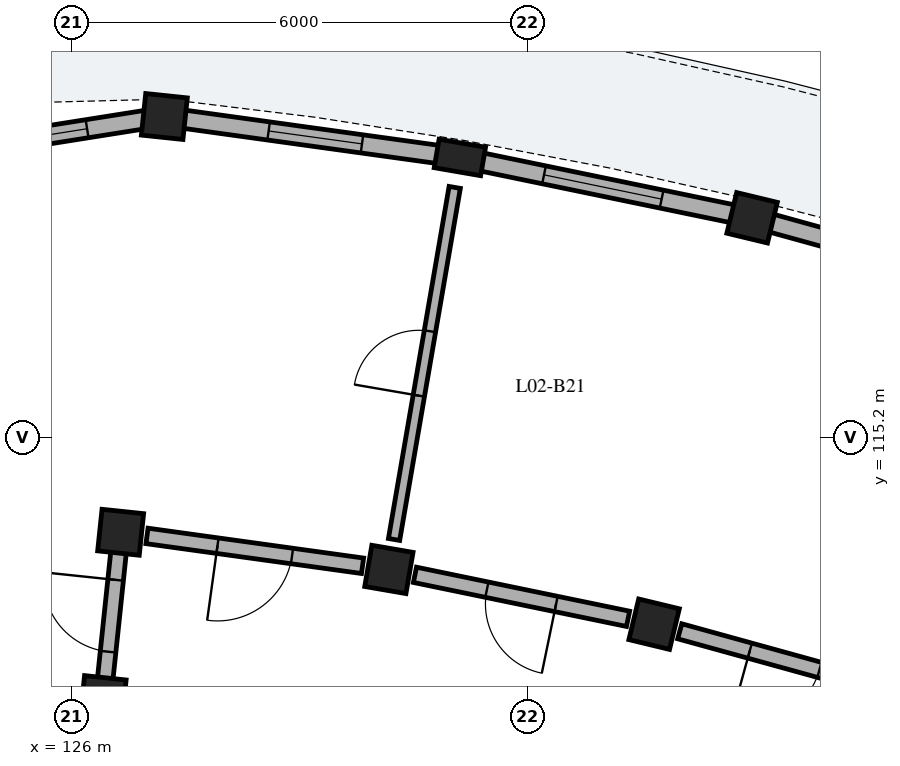
"""IFC4 building model, lengths in metres.
Left out: names, types, materials, properties, quantities, classifications, styles, units other than length and angle.
Written with IfcOpenShell. Run it as: python <this file> out.ifc"""

import sys

from ifc_helpers import new_model, si_unit, direction, frame, frame_2d, origin, origin_2d, place, context, subcontext, project, spatial, rectangle, extrude, element, fill, save


model = new_model("IFC4")
c1 = context("Model", 3, precision=1e-05, world=origin(), true_north=direction((0.0, 1.0)))
c2 = subcontext(c1, "Body", "Model", "MODEL_VIEW")
j1 = project(units=[si_unit("LENGTHUNIT", "METRE"), si_unit("PLANEANGLEUNIT", "RADIAN")], contexts=[c1])
p1 = place(None, origin())
s1 = spatial("IfcSite", under=j1, at=p1, CompositionType="ELEMENT")
p2 = place(p1, origin())
s2 = spatial("IfcBuilding", under=s1, at=p2, CompositionType="ELEMENT")
p3 = place(p2, frame((0.0, 0.0, 8.84)))
s3 = spatial("IfcBuildingStorey", under=s2, at=p3, CompositionType="ELEMENT", Elevation=8.84)
for number, where, z_axis, x_axis in (
    (1, (133.669, 112.744, 0.0), (0.0, 0.0, 1.0), (0.234, 0.972, 0.0)),
    (2, (134.958, 118.091, 0.0), (0.0, 0.0, 1.0), (0.234, 0.972, 0.0)),
    (3, (130.179, 113.465, 0.0), (0.0, 0.0, 1.0), (0.17, 0.985, 0.0)),
):
    element("IfcColumn", number, at=place(p3, frame(where, z_axis=z_axis, x_axis=x_axis)), inside=s3, PredefinedType="COLUMN", context=c2, shape_type="SweptSolid", body=[
        extrude(rectangle(XDim=0.55, YDim=0.55, at=origin_2d()), origin(), (0.0, 0.0, 1.0), 3.105),
    ])
p4 = place(p3, frame((131.113, 118.885, 0.0), z_axis=(0.0, 0.0, 1.0), x_axis=(0.169827230012, 0.985473851478, 0.0)))
e4 = element("IfcColumn", 4, at=p4, inside=s3, PredefinedType="PILASTER", context=c2, shape_type="SweptSolid", body=[
    extrude(rectangle(XDim=0.38, YDim=0.62, at=origin_2d()), origin(), (0.0, 0.0, 1.0), 3.105),
])
for number, where, z_axis, x_axis in (
    (5, (126.42, 111.766, 0.0), (0.0, 0.0, 1.0), (0.105, 0.995, 0.0)),
    (6, (126.65, 113.954, 0.0), (0.0, 0.0, 1.0), (0.105, 0.995, 0.0)),
    (7, (127.225, 119.424, 0.0), (0.0, 0.0, 1.0), (0.105, 0.995, 0.0)),
):
    element("IfcColumn", number, at=place(p3, frame(where, z_axis=z_axis, x_axis=x_axis)), inside=s3, PredefinedType="COLUMN", context=c2, shape_type="SweptSolid", body=[
        extrude(rectangle(XDim=0.55, YDim=0.55, at=origin_2d()), origin(), (0.0, 0.0, 1.0), 3.105),
    ])
p5 = place(p3, frame((138.587, 117.088, 0.0), z_axis=(0.0, 0.0, 1.0), x_axis=(-0.963894473631, 0.266284516456, 0.0)))
e8 = element("IfcWall", 8, at=p5, inside=s3, PredefinedType="SOLIDWALL", context=c2, shape_type="SweptSolid", body=[
    extrude(rectangle(XDim=3.521, YDim=0.24, at=frame_2d((1.76, 0.0))), origin(), (0.0, 0.0, 1.0), 2.355),
])
p6 = place(p5, frame((1.12, 0.0, 0.55)))
e9 = element("IfcOpeningElement", 9, at=p6, cuts=e8, PredefinedType="OPENING", context=c2, shape_type="SweptSolid", body=[
    extrude(rectangle(XDim=1.28, YDim=1.52, at=frame_2d((0.64, 0.76))), frame((0.0, 0.13, 0.0), z_axis=(0.0, -1.0, 0.0), x_axis=(1.0, 0.0, 0.0)), (0.0, 0.0, 1.0), 0.26),
])
p7 = place(p3, frame((134.718, 118.141, 0.0), z_axis=(0.0, 0.0, 1.0), x_axis=(-0.979340051053, 0.202220336275, 0.0)))
e10 = element("IfcWall", 10, at=p7, inside=s3, PredefinedType="SOLIDWALL", context=c2, shape_type="SweptSolid", body=[
    extrude(rectangle(XDim=3.521, YDim=0.24, at=frame_2d((1.76, 0.0))), origin(), (0.0, 0.0, 1.0), 2.355),
])
p8 = place(p7, frame((0.97, 0.0, 0.35)))
e11 = element("IfcOpeningElement", 11, at=p8, cuts=e10, PredefinedType="OPENING", context=c2, shape_type="SweptSolid", body=[
    extrude(rectangle(XDim=1.58, YDim=1.68, at=frame_2d((0.79, 0.84))), frame((0.0, 0.13, 0.0), z_axis=(0.0, -1.0, 0.0), x_axis=(1.0, 0.0, 0.0)), (0.0, 0.0, 1.0), 0.26),
])
p9 = place(p3, frame((130.955, 118.907, 0.0), z_axis=(0.0, 0.0, 1.0), x_axis=(-0.990539718913, 0.137226328578, 0.0)))
e12 = element("IfcWall", 12, at=p9, inside=s3, PredefinedType="SOLIDWALL", context=c2, shape_type="SweptSolid", body=[
    extrude(rectangle(XDim=3.521, YDim=0.24, at=frame_2d((1.76, 0.0))), origin(), (0.0, 0.0, 1.0), 2.355),
])
p10 = place(p9, frame((1.14, 0.0, 0.55)))
e13 = element("IfcOpeningElement", 13, at=p10, cuts=e12, PredefinedType="OPENING", context=c2, shape_type="SweptSolid", body=[
    extrude(rectangle(XDim=1.24, YDim=1.535, at=frame_2d((0.62, 0.768))), frame((0.0, 0.13, 0.0), z_axis=(0.0, -1.0, 0.0), x_axis=(1.0, 0.0, 0.0)), (0.0, 0.0, 1.0), 0.26),
])
p11 = place(p3, frame((123.365, 118.812, 0.0), z_axis=(0.0, 0.0, 1.0), x_axis=(0.987690429048, 0.156421278498, 0.0)))
e14 = element("IfcWall", 14, at=p11, inside=s3, PredefinedType="SOLIDWALL", context=c2, shape_type="SweptSolid", body=[
    extrude(rectangle(XDim=3.908, YDim=0.24, at=frame_2d((1.954, 0.0))), origin(), (0.0, 0.0, 1.0), 2.355),
])
p12 = place(p11, frame((1.029, 0.0, 0.4)))
e15 = element("IfcOpeningElement", 15, at=p12, cuts=e14, PredefinedType="OPENING", context=c2, shape_type="SweptSolid", body=[
    extrude(rectangle(XDim=1.85, YDim=1.72, at=frame_2d((0.925, 0.86))), frame((0.0, 0.13, 0.0), z_axis=(0.0, -1.0, 0.0), x_axis=(1.0, 0.0, 0.0)), (0.0, 0.0, 1.0), 0.26),
])
p13 = place(p3, frame((136.766, 111.889, 0.0), z_axis=(0.0, 0.0, 1.0), x_axis=(-0.963890789093, 0.266297853356, 0.0)))
e16 = element("IfcWall", 16, at=p13, inside=s3, PredefinedType="PARTITIONING", context=c2, shape_type="SweptSolid", body=[
    extrude(rectangle(XDim=2.863, YDim=0.205, at=frame_2d((1.432, 0.0))), origin(), (0.0, 0.0, 1.0), 2.37),
])
p14 = place(p13, frame((0.957, 0.0, 0.0)))
e17 = element("IfcOpeningElement", 17, at=p14, cuts=e16, PredefinedType="OPENING", context=c2, shape_type="SweptSolid", body=[
    extrude(rectangle(XDim=0.95, YDim=2.13, at=frame_2d((0.475, 1.065))), frame((0.0, 0.113, 0.0), z_axis=(0.0, -1.0, 0.0), x_axis=(1.0, 0.0, 0.0)), (0.0, 0.0, 1.0), 0.225),
])
p15 = place(p3, frame((133.326, 112.815, 0.0), z_axis=(0.0, 0.0, 1.0), x_axis=(-0.979348418612, 0.202179808492, 0.0)))
e18 = element("IfcWall", 18, at=p15, inside=s3, PredefinedType="PARTITIONING", context=c2, shape_type="SweptSolid", body=[
    extrude(rectangle(XDim=2.863, YDim=0.205, at=frame_2d((1.432, 0.0))), origin(), (0.0, 0.0, 1.0), 2.37),
])
p16 = place(p15, frame((0.967, 0.0, 0.0)))
e19 = element("IfcOpeningElement", 19, at=p16, cuts=e18, PredefinedType="OPENING", context=c2, shape_type="SweptSolid", body=[
    extrude(rectangle(XDim=0.93, YDim=2.12, at=frame_2d((0.465, 1.06))), frame((0.0, 0.113, 0.0), z_axis=(0.0, -1.0, 0.0), x_axis=(1.0, 0.0, 0.0)), (0.0, 0.0, 1.0), 0.225),
])
p17 = place(p3, frame((130.247, 113.859, 0.0), z_axis=(0.0, 0.0, 1.0), x_axis=(0.169812980219, 0.985476307046, 0.0)))
e20 = element("IfcWall", 20, at=p17, inside=s3, PredefinedType="PLUMBINGWALL", context=c2, shape_type="SweptSolid", body=[
    extrude(rectangle(XDim=4.7, YDim=0.15, at=frame_2d((2.35, 0.0))), origin(), (0.0, 0.0, 1.0), 2.37),
])
p18 = place(p17, frame((1.92, 0.0, 0.0)))
e21 = element("IfcOpeningElement", 21, at=p18, cuts=e20, PredefinedType="OPENING", context=c2, shape_type="SweptSolid", body=[
    extrude(rectangle(XDim=0.86, YDim=2.06, at=frame_2d((0.43, 1.03))), frame((0.0, 0.085, 0.0), z_axis=(0.0, -1.0, 0.0), x_axis=(1.0, 0.0, 0.0)), (0.0, 0.0, 1.0), 0.17),
])
p19 = place(p3, frame((129.833, 113.513, 0.0), z_axis=(0.0, 0.0, 1.0), x_axis=(-0.990544162976, 0.137194246211, 0.0)))
e22 = element("IfcWall", 22, at=p19, inside=s3, PredefinedType="PARTITIONING", context=c2, shape_type="SweptSolid", body=[
    extrude(rectangle(XDim=2.863, YDim=0.205, at=frame_2d((1.432, 0.0))), origin(), (0.0, 0.0, 1.0), 2.37),
])
p20 = place(p19, frame((0.937, 0.0, 0.0)))
e23 = element("IfcOpeningElement", 23, at=p20, cuts=e22, PredefinedType="OPENING", context=c2, shape_type="SweptSolid", body=[
    extrude(rectangle(XDim=0.99, YDim=2.16, at=frame_2d((0.495, 1.08))), frame((0.0, 0.113, 0.0), z_axis=(0.0, -1.0, 0.0), x_axis=(1.0, 0.0, 0.0)), (0.0, 0.0, 1.0), 0.225),
])
p21 = place(p3, frame((126.425, 111.816, 0.0), z_axis=(0.0, 0.0, 1.0), x_axis=(0.104509292252, 0.994523910136, 0.0)))
e24 = element("IfcWall", 24, at=p21, inside=s3, PredefinedType="PARTITIONING", context=c2, shape_type="SweptSolid", body=[
    extrude(rectangle(XDim=2.1, YDim=0.205, at=frame_2d((1.05, 0.0))), origin(), (0.0, 0.0, 1.0), 2.37),
])
p22 = place(p21, frame((0.57, 0.0, 0.0)))
e25 = element("IfcOpeningElement", 25, at=p22, cuts=e24, PredefinedType="OPENING", context=c2, shape_type="SweptSolid", body=[
    extrude(rectangle(XDim=0.95, YDim=2.13, at=frame_2d((0.475, 1.065))), frame((0.0, 0.113, 0.0), z_axis=(0.0, -1.0, 0.0), x_axis=(1.0, 0.0, 0.0)), (0.0, 0.0, 1.0), 0.225),
])
p23 = place(p8, origin())
e26 = element("IfcWindow", 26, at=p23, inside=s3, PartitioningType="SINGLE_PANEL", PredefinedType="WINDOW", context=c2, shape_type="SweptSolid", body=[
    extrude(rectangle(XDim=1.58, YDim=1.68, at=frame_2d((0.79, 0.84))), frame((0.0, 0.03, 0.0), z_axis=(0.0, -1.0, 0.0), x_axis=(1.0, 0.0, 0.0)), (0.0, 0.0, 1.0), 0.06),
])
fill(e11, e26)
p24 = place(p10, origin())
e27 = element("IfcWindow", 27, at=p24, inside=s3, PartitioningType="SINGLE_PANEL", PredefinedType="WINDOW", context=c2, shape_type="SweptSolid", body=[
    extrude(rectangle(XDim=1.24, YDim=1.535, at=frame_2d((0.62, 0.768))), frame((0.0, 0.03, 0.0), z_axis=(0.0, -1.0, 0.0), x_axis=(1.0, 0.0, 0.0)), (0.0, 0.0, 1.0), 0.06),
])
fill(e13, e27)
p25 = place(p12, origin())
e28 = element("IfcWindow", 28, at=p25, inside=s3, PartitioningType="SINGLE_PANEL", PredefinedType="WINDOW", context=c2, shape_type="SweptSolid", body=[
    extrude(rectangle(XDim=1.85, YDim=1.72, at=frame_2d((0.925, 0.86))), frame((0.0, 0.03, 0.0), z_axis=(0.0, -1.0, 0.0), x_axis=(1.0, 0.0, 0.0)), (0.0, 0.0, 1.0), 0.06),
])
fill(e15, e28)
p26 = place(p14, origin())
e29 = element("IfcDoor", 29, at=p26, inside=s3, OperationType="SINGLE_SWING_RIGHT", PredefinedType="DOOR", context=c2, shape_type="SweptSolid", body=[
    extrude(rectangle(XDim=0.95, YDim=2.13, at=frame_2d((0.475, 1.065))), frame((0.0, 0.025, 0.0), z_axis=(0.0, -1.0, 0.0), x_axis=(1.0, 0.0, 0.0)), (0.0, 0.0, 1.0), 0.05),
])
fill(e17, e29)
p27 = place(p16, origin())
e30 = element("IfcDoor", 30, at=p27, inside=s3, OperationType="SINGLE_SWING_LEFT", PredefinedType="DOOR", context=c2, shape_type="SweptSolid", body=[
    extrude(rectangle(XDim=0.93, YDim=2.12, at=frame_2d((0.465, 1.06))), frame((0.0, 0.025, 0.0), z_axis=(0.0, -1.0, 0.0), x_axis=(1.0, 0.0, 0.0)), (0.0, 0.0, 1.0), 0.05),
])
fill(e19, e30)
p28 = place(p18, origin())
e31 = element("IfcDoor", 31, at=p28, inside=s3, OperationType="SINGLE_SWING_LEFT", PredefinedType="DOOR", context=c2, shape_type="SweptSolid", body=[
    extrude(rectangle(XDim=0.86, YDim=2.06, at=frame_2d((0.43, 1.03))), frame((0.0, 0.025, 0.0), z_axis=(0.0, -1.0, 0.0), x_axis=(1.0, 0.0, 0.0)), (0.0, 0.0, 1.0), 0.05),
])
fill(e21, e31)
p29 = place(p20, origin())
e32 = element("IfcDoor", 32, at=p29, inside=s3, OperationType="SINGLE_SWING_RIGHT", PredefinedType="DOOR", context=c2, shape_type="SweptSolid", body=[
    extrude(rectangle(XDim=0.99, YDim=2.16, at=frame_2d((0.495, 1.08))), frame((0.0, 0.025, 0.0), z_axis=(0.0, -1.0, 0.0), x_axis=(1.0, 0.0, 0.0)), (0.0, 0.0, 1.0), 0.05),
])
fill(e23, e32)
p30 = place(p22, origin())
e33 = element("IfcDoor", 33, at=p30, inside=s3, OperationType="SINGLE_SWING_RIGHT", PredefinedType="DOOR", context=c2, shape_type="SweptSolid", body=[
    extrude(rectangle(XDim=0.95, YDim=2.13, at=frame_2d((0.475, 1.065))), frame((0.0, 0.025, 0.0), z_axis=(0.0, -1.0, 0.0), x_axis=(1.0, 0.0, 0.0)), (0.0, 0.0, 1.0), 0.05),
])
fill(e25, e33)
save(model, sys.argv[1])
